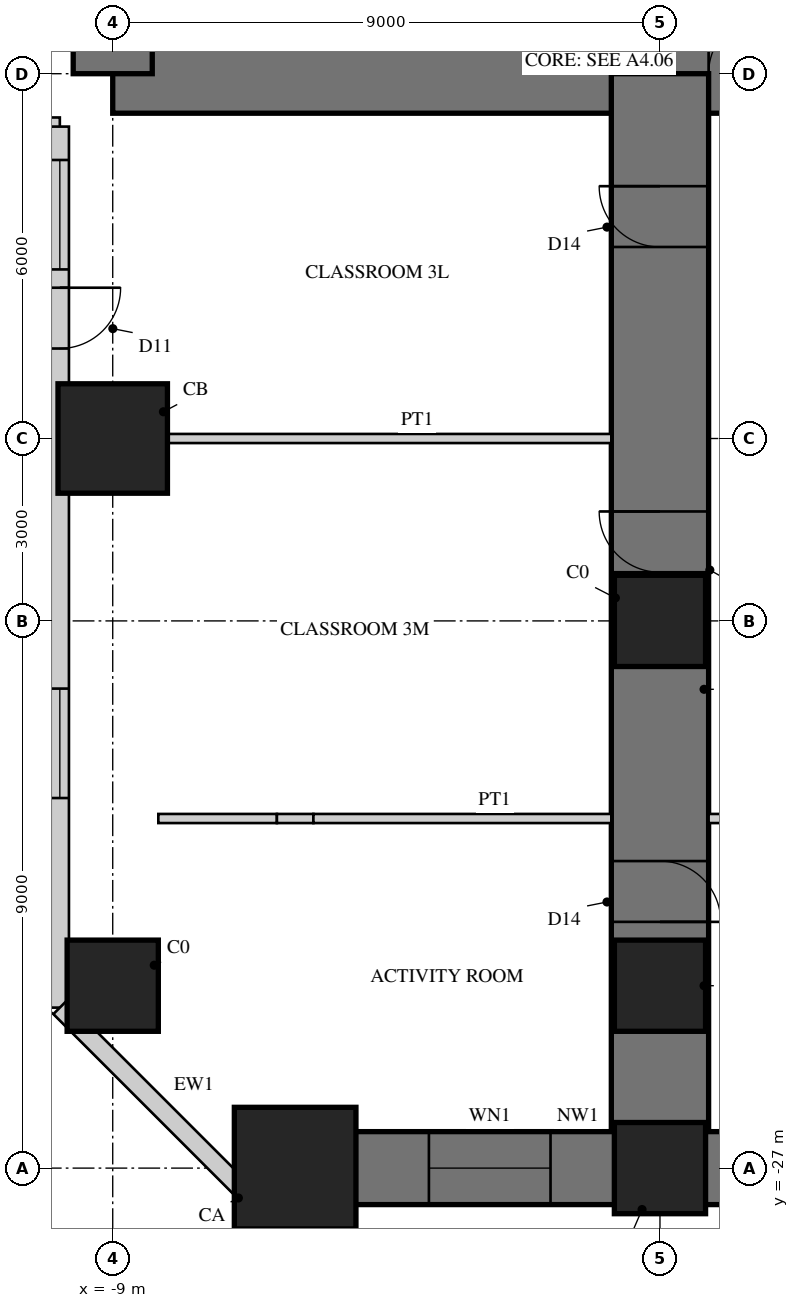
"""IFC4 building model, lengths in metres.
Left out: names, types, materials, properties, quantities, classifications, styles, units other than length and angle.
Written with IfcOpenShell. Run it as: python <this file> out.ifc"""

import sys

from ifc_helpers import new_model, si_unit, direction, frame, frame_2d, origin, origin_2d, place, context, subcontext, project, spatial, rectangle, hollow_rectangle, extrude, element, fill, save


model = new_model("IFC4")
c1 = context("Model", 3, precision=1e-05, world=origin(), true_north=direction((0.0, 1.0)))
c2 = subcontext(c1, "Body", "Model", "MODEL_VIEW")
j1 = project(units=[si_unit("LENGTHUNIT", "METRE"), si_unit("PLANEANGLEUNIT", "RADIAN")], contexts=[c1])
p1 = place(None, origin())
s1 = spatial("IfcSite", under=j1, at=p1, CompositionType="ELEMENT")
p2 = place(p1, origin())
s2 = spatial("IfcBuilding", under=s1, at=p2, CompositionType="ELEMENT")
p3 = place(p2, frame((0.0, 0.0, 14.0)))
s3 = spatial("IfcBuildingStorey", under=s2, at=p3, CompositionType="ELEMENT", Elevation=14.0)
p4 = place(p3, frame((-9.0, -9.0, 0.0), z_axis=(0.0, 0.0, 1.0), x_axis=(1.0, 0.0, 0.0)))
e1 = element("IfcWall", 1, at=p4, inside=s3, PredefinedType="SHEAR", context=c2, shape_type="SweptSolid", body=[
    extrude(rectangle(XDim=18.0, YDim=1.3, at=frame_2d((9.0, 0.0))), origin(), (0.0, 0.0, 1.0), 4.5),
])
p5 = place(p4, frame((9.8, 0.0, 0.0)))
e2 = element("IfcOpeningElement", 2, at=p5, cuts=e1, PredefinedType="OPENING", context=c2, shape_type="SweptSolid", body=[
    extrude(rectangle(XDim=1.0, YDim=2.4, at=frame_2d((0.5, 1.2))), frame((0.0, 0.66, 0.0), z_axis=(0.0, -1.0, 0.0), x_axis=(1.0, 0.0, 0.0)), (0.0, 0.0, 1.0), 1.32),
])
p6 = place(p3, frame((-9.0, 9.0, 0.0), z_axis=(0.0, 0.0, 1.0), x_axis=(0.0, -1.0, 0.0)))
e3 = element("IfcWall", 3, at=p6, inside=s3, PredefinedType="SHEAR", context=c2, shape_type="SweptSolid", body=[
    extrude(rectangle(XDim=18.0, YDim=1.3, at=frame_2d((9.0, 0.0))), origin(), (0.0, 0.0, 1.0), 4.5),
])
p7 = place(p6, frame((9.8, 0.0, 0.0)))
e4 = element("IfcOpeningElement", 4, at=p7, cuts=e3, PredefinedType="OPENING", context=c2, shape_type="SweptSolid", body=[
    extrude(rectangle(XDim=1.0, YDim=2.4, at=frame_2d((0.5, 1.2))), frame((0.0, 0.66, 0.0), z_axis=(0.0, -1.0, 0.0), x_axis=(1.0, 0.0, 0.0)), (0.0, 0.0, 1.0), 1.32),
])
p8 = place(p3, frame((0.0, -9.0, 0.0), z_axis=(0.0, 0.0, 1.0), x_axis=(0.0, -1.0, 0.0)))
e5 = element("IfcWall", 5, at=p8, inside=s3, PredefinedType="SHEAR", context=c2, shape_type="SweptSolid", body=[
    extrude(rectangle(XDim=18.0, YDim=1.6, at=frame_2d((9.0, 0.0))), origin(), (0.0, 0.0, 1.0), 4.5),
])
p9 = place(p8, frame((1.85, 0.0, 0.0)))
e6 = element("IfcOpeningElement", 6, at=p9, cuts=e5, PredefinedType="OPENING", context=c2, shape_type="SweptSolid", body=[
    extrude(rectangle(XDim=1.0, YDim=2.2, at=frame_2d((0.5, 1.1))), frame((0.0, 0.81, 0.0), z_axis=(0.0, -1.0, 0.0), x_axis=(1.0, 0.0, 0.0)), (0.0, 0.0, 1.0), 1.62),
])
p10 = place(p8, frame((7.2, 0.0, 0.0)))
e7 = element("IfcOpeningElement", 7, at=p10, cuts=e5, PredefinedType="OPENING", context=c2, shape_type="SweptSolid", body=[
    extrude(rectangle(XDim=1.0, YDim=2.2, at=frame_2d((0.5, 1.1))), frame((0.0, 0.81, 0.0), z_axis=(0.0, -1.0, 0.0), x_axis=(1.0, 0.0, 0.0)), (0.0, 0.0, 1.0), 1.62),
])
p11 = place(p8, frame((12.95, 0.0, 0.0)))
e8 = element("IfcOpeningElement", 8, at=p11, cuts=e5, PredefinedType="OPENING", context=c2, shape_type="SweptSolid", body=[
    extrude(rectangle(XDim=1.0, YDim=2.2, at=frame_2d((0.5, 1.1))), frame((0.0, 0.81, 0.0), z_axis=(0.0, -1.0, 0.0), x_axis=(1.0, 0.0, 0.0)), (0.0, 0.0, 1.0), 1.62),
])
p12 = place(p3, frame((-6.0, -27.0, 0.0), z_axis=(0.0, 0.0, 1.0), x_axis=(1.0, 0.0, 0.0)))
e9 = element("IfcWall", 9, at=p12, inside=s3, PredefinedType="SHEAR", context=c2, shape_type="SweptSolid", body=[
    extrude(rectangle(XDim=12.0, YDim=1.2, at=frame_2d((6.0, 0.0))), origin(), (0.0, 0.0, 1.0), 4.5),
])
p13 = place(p12, frame((2.2, 0.0, 0.9)))
e10 = element("IfcOpeningElement", 10, at=p13, cuts=e9, PredefinedType="OPENING", context=c2, shape_type="SweptSolid", body=[
    extrude(rectangle(XDim=2.0, YDim=1.8, at=frame_2d((1.0, 0.9))), frame((0.0, 0.61, 0.0), z_axis=(0.0, -1.0, 0.0), x_axis=(1.0, 0.0, 0.0)), (0.0, 0.0, 1.0), 1.22),
])
p14 = place(p12, frame((7.8, 0.0, 0.9)))
e11 = element("IfcOpeningElement", 11, at=p14, cuts=e9, PredefinedType="OPENING", context=c2, shape_type="SweptSolid", body=[
    extrude(rectangle(XDim=2.0, YDim=1.8, at=frame_2d((1.0, 0.9))), frame((0.0, 0.61, 0.0), z_axis=(0.0, -1.0, 0.0), x_axis=(1.0, 0.0, 0.0)), (0.0, 0.0, 1.0), 1.22),
])
p15 = place(p3, frame((-9.0, -15.0, 0.0), z_axis=(0.0, 0.0, 1.0), x_axis=(1.0, 0.0, 0.0)))
e12 = element("IfcColumn", 12, at=p15, inside=s3, PredefinedType="COLUMN", context=c2, shape_type="SweptSolid", body=[
    extrude(rectangle(XDim=1.8, YDim=1.8, at=origin_2d()), origin(), (0.0, 0.0, 1.0), 4.5),
])
p16 = place(p3, frame((-9.0, -24.0, 0.0), z_axis=(0.0, 0.0, 1.0), x_axis=(1.0, 0.0, 0.0)))
e13 = element("IfcColumn", 13, at=p16, inside=s3, PredefinedType="COLUMN", context=c2, shape_type="SweptSolid", body=[
    extrude(rectangle(XDim=1.5, YDim=1.5, at=origin_2d()), origin(), (0.0, 0.0, 1.0), 4.5),
])
p17 = place(p3, frame((-6.0, -27.0, 0.0), z_axis=(0.0, 0.0, 1.0), x_axis=(1.0, 0.0, 0.0)))
e14 = element("IfcColumn", 14, at=p17, inside=s3, PredefinedType="COLUMN", context=c2, shape_type="SweptSolid", body=[
    extrude(rectangle(XDim=2.0, YDim=2.0, at=origin_2d()), origin(), (0.0, 0.0, 1.0), 4.5),
])
for number, where, z_axis, x_axis in (
    (15, (0.0, -27.0, 0.0), (0.0, 0.0, 1.0), (1.0, 0.0, 0.0)),
    (16, (0.0, -18.0, 0.0), (0.0, 0.0, 1.0), (1.0, 0.0, 0.0)),
    (17, (0.0, -24.0, 0.0), (0.0, 0.0, 1.0), (1.0, 0.0, 0.0)),
):
    element("IfcColumn", number, at=place(p3, frame(where, z_axis=z_axis, x_axis=x_axis)), inside=s3, PredefinedType="COLUMN", context=c2, shape_type="SweptSolid", body=[
        extrude(rectangle(XDim=1.5, YDim=1.5, at=origin_2d()), origin(), (0.0, 0.0, 1.0), 4.5),
    ])
p18 = place(p3, frame((-24.36, -9.87, 0.0), z_axis=(0.0, 0.0, 1.0), x_axis=(1.0, 0.0, 0.0)))
e18 = element("IfcWall", 18, at=p18, inside=s3, PredefinedType="SOLIDWALL", context=c2, shape_type="SweptSolid", body=[
    extrude(rectangle(XDim=14.49, YDim=0.3, at=frame_2d((7.245, 0.0))), origin(), (0.0, 0.0, 1.0), 4.25),
])
p19 = place(p18, frame((10.9, 0.0, 0.0)))
e19 = element("IfcOpeningElement", 19, at=p19, cuts=e18, PredefinedType="OPENING", context=c2, shape_type="SweptSolid", body=[
    extrude(rectangle(XDim=1.0, YDim=2.4, at=frame_2d((0.5, 1.2))), frame((0.0, 0.16, 0.0), z_axis=(0.0, -1.0, 0.0), x_axis=(1.0, 0.0, 0.0)), (0.0, 0.0, 1.0), 0.32),
])
p20 = place(p18, frame((3.447, 0.0, 0.6)))
e20 = element("IfcOpeningElement", 20, at=p20, cuts=e18, PredefinedType="OPENING", context=c2, shape_type="SweptSolid", body=[
    extrude(rectangle(XDim=1.8, YDim=2.1, at=frame_2d((0.9, 1.05))), frame((0.0, 0.16, 0.0), z_axis=(0.0, -1.0, 0.0), x_axis=(1.0, 0.0, 0.0)), (0.0, 0.0, 1.0), 0.32),
])
p21 = place(p18, frame((12.141, 0.0, 0.6)))
e21 = element("IfcOpeningElement", 21, at=p21, cuts=e18, PredefinedType="OPENING", context=c2, shape_type="SweptSolid", body=[
    extrude(rectangle(XDim=1.8, YDim=2.1, at=frame_2d((0.9, 1.05))), frame((0.0, 0.16, 0.0), z_axis=(0.0, -1.0, 0.0), x_axis=(1.0, 0.0, 0.0)), (0.0, 0.0, 1.0), 0.32),
])
p22 = place(p3, frame((-9.87, -9.87, 0.0), z_axis=(0.0, 0.0, 1.0), x_axis=(0.0, -1.0, 0.0)))
e22 = element("IfcWall", 22, at=p22, inside=s3, PredefinedType="SOLIDWALL", context=c2, shape_type="SweptSolid", body=[
    extrude(rectangle(XDim=14.49, YDim=0.3, at=frame_2d((7.245, 0.0))), origin(), (0.0, 0.0, 1.0), 4.25),
])
p23 = place(p22, frame((2.65, 0.0, 0.0)))
e23 = element("IfcOpeningElement", 23, at=p23, cuts=e22, PredefinedType="OPENING", context=c2, shape_type="SweptSolid", body=[
    extrude(rectangle(XDim=1.0, YDim=2.4, at=frame_2d((0.5, 1.2))), frame((0.0, 0.16, 0.0), z_axis=(0.0, -1.0, 0.0), x_axis=(1.0, 0.0, 0.0)), (0.0, 0.0, 1.0), 0.32),
])
p24 = place(p22, frame((0.549, 0.0, 0.6)))
e24 = element("IfcOpeningElement", 24, at=p24, cuts=e22, PredefinedType="OPENING", context=c2, shape_type="SweptSolid", body=[
    extrude(rectangle(XDim=1.8, YDim=2.1, at=frame_2d((0.9, 1.05))), frame((0.0, 0.16, 0.0), z_axis=(0.0, -1.0, 0.0), x_axis=(1.0, 0.0, 0.0)), (0.0, 0.0, 1.0), 0.32),
])
p25 = place(p22, frame((9.243, 0.0, 0.6)))
e25 = element("IfcOpeningElement", 25, at=p25, cuts=e22, PredefinedType="OPENING", context=c2, shape_type="SweptSolid", body=[
    extrude(rectangle(XDim=1.8, YDim=2.1, at=frame_2d((0.9, 1.05))), frame((0.0, 0.16, 0.0), z_axis=(0.0, -1.0, 0.0), x_axis=(1.0, 0.0, 0.0)), (0.0, 0.0, 1.0), 0.32),
])
p26 = place(p3, frame((-9.87, -24.36, 0.0), z_axis=(0.0, 0.0, 1.0), x_axis=(0.707106781187, -0.707106781187, 0.0)))
e26 = element("IfcWall", 26, at=p26, inside=s3, PredefinedType="SOLIDWALL", context=c2, shape_type="SweptSolid", body=[
    extrude(rectangle(XDim=4.582, YDim=0.3, at=frame_2d((2.291, 0.0))), origin(), (0.0, 0.0, 1.0), 4.25),
])
p27 = place(p3, frame((-8.25, -15.0, 0.0), z_axis=(0.0, 0.0, 1.0), x_axis=(1.0, 0.0, 0.0)))
e27 = element("IfcWall", 27, at=p27, inside=s3, PredefinedType="PARTITIONING", context=c2, shape_type="SweptSolid", body=[
    extrude(rectangle(XDim=7.45, YDim=0.15, at=frame_2d((3.725, 0.0))), origin(), (0.0, 0.0, 1.0), 3.2),
])
p28 = place(p3, frame((-8.25, -21.25, 0.0), z_axis=(0.0, 0.0, 1.0), x_axis=(1.0, 0.0, 0.0)))
e28 = element("IfcWall", 28, at=p28, inside=s3, PredefinedType="PARTITIONING", context=c2, shape_type="SweptSolid", body=[
    extrude(rectangle(XDim=1.95, YDim=0.15, at=frame_2d((0.975, 0.0))), origin(), (0.0, 0.0, 1.0), 3.3),
])
p29 = place(p3, frame((-6.3, -21.25, 0.0), z_axis=(0.0, 0.0, 1.0), x_axis=(1.0, 0.0, 0.0)))
e29 = element("IfcWall", 29, at=p29, inside=s3, PredefinedType="PARTITIONING", context=c2, shape_type="SweptSolid", body=[
    extrude(rectangle(XDim=0.6, YDim=0.15, at=frame_2d((0.3, 0.0))), origin(), (0.0, 0.0, 1.0), 4.25),
])
p30 = place(p3, frame((-5.7, -21.25, 0.0), z_axis=(0.0, 0.0, 1.0), x_axis=(1.0, 0.0, 0.0)))
e30 = element("IfcWall", 30, at=p30, inside=s3, PredefinedType="PARTITIONING", context=c2, shape_type="SweptSolid", body=[
    extrude(rectangle(XDim=4.9, YDim=0.15, at=frame_2d((2.45, 0.0))), origin(), (0.0, 0.0, 1.0), 3.3),
])
p31 = place(p3, frame((0.8, -21.25, 0.0), z_axis=(0.0, 0.0, 1.0), x_axis=(1.0, 0.0, 0.0)))
e31 = element("IfcWall", 31, at=p31, inside=s3, PredefinedType="PARTITIONING", context=c2, shape_type="SweptSolid", body=[
    extrude(rectangle(XDim=4.9, YDim=0.15, at=frame_2d((2.45, 0.0))), origin(), (0.0, 0.0, 1.0), 3.3),
])
p32 = place(p31, frame((0.35, 0.0, 0.0)))
e32 = element("IfcOpeningElement", 32, at=p32, cuts=e31, PredefinedType="OPENING", context=c2, shape_type="SweptSolid", body=[
    extrude(rectangle(XDim=1.0, YDim=2.2, at=frame_2d((0.5, 1.1))), frame((0.0, 0.085, 0.0), z_axis=(0.0, -1.0, 0.0), x_axis=(1.0, 0.0, 0.0)), (0.0, 0.0, 1.0), 0.17),
])
p33 = place(p23, origin())
e33 = element("IfcDoor", 33, at=p33, inside=s3, OperationType="SINGLE_SWING_LEFT", PredefinedType="DOOR", context=c2, shape_type="SweptSolid", body=[
    extrude(hollow_rectangle(XDim=1.0, YDim=2.4, WallThickness=0.06, at=frame_2d((0.5, 1.2))), frame((0.0, 0.025, 0.0), z_axis=(0.0, -1.0, 0.0), x_axis=(1.0, 0.0, 0.0)), (0.0, 0.0, 1.0), 0.05),
    extrude(rectangle(XDim=0.879, YDim=2.279, at=frame_2d((0.5, 1.2))), frame((0.0, 0.025, 0.0), z_axis=(0.0, -1.0, 0.0), x_axis=(1.0, 0.0, 0.0)), (0.0, 0.0, 1.0), 0.05),
])
fill(e23, e33)
p34 = place(p24, origin())
e34 = element("IfcWindow", 34, at=p34, inside=s3, PartitioningType="SINGLE_PANEL", PredefinedType="WINDOW", context=c2, shape_type="SweptSolid", body=[
    extrude(hollow_rectangle(XDim=1.8, YDim=2.1, WallThickness=0.06, at=frame_2d((0.9, 1.05))), frame((0.0, 0.03, 0.0), z_axis=(0.0, -1.0, 0.0), x_axis=(1.0, 0.0, 0.0)), (0.0, 0.0, 1.0), 0.06),
    extrude(rectangle(XDim=1.679, YDim=1.979, at=frame_2d((0.9, 1.05))), frame((0.0, 0.03, 0.0), z_axis=(0.0, -1.0, 0.0), x_axis=(1.0, 0.0, 0.0)), (0.0, 0.0, 1.0), 0.06),
])
fill(e24, e34)
p35 = place(p25, origin())
e35 = element("IfcWindow", 35, at=p35, inside=s3, PartitioningType="SINGLE_PANEL", PredefinedType="WINDOW", context=c2, shape_type="SweptSolid", body=[
    extrude(hollow_rectangle(XDim=1.8, YDim=2.1, WallThickness=0.06, at=frame_2d((0.9, 1.05))), frame((0.0, 0.03, 0.0), z_axis=(0.0, -1.0, 0.0), x_axis=(1.0, 0.0, 0.0)), (0.0, 0.0, 1.0), 0.06),
    extrude(rectangle(XDim=1.679, YDim=1.979, at=frame_2d((0.9, 1.05))), frame((0.0, 0.03, 0.0), z_axis=(0.0, -1.0, 0.0), x_axis=(1.0, 0.0, 0.0)), (0.0, 0.0, 1.0), 0.06),
])
fill(e25, e35)
p36 = place(p13, origin())
e36 = element("IfcWindow", 36, at=p36, inside=s3, PartitioningType="SINGLE_PANEL", PredefinedType="WINDOW", context=c2, shape_type="SweptSolid", body=[
    extrude(hollow_rectangle(XDim=2.0, YDim=1.8, WallThickness=0.06, at=frame_2d((1.0, 0.9))), frame((0.0, 0.03, 0.0), z_axis=(0.0, -1.0, 0.0), x_axis=(1.0, 0.0, 0.0)), (0.0, 0.0, 1.0), 0.06),
    extrude(rectangle(XDim=1.879, YDim=1.679, at=frame_2d((1.0, 0.9))), frame((0.0, 0.03, 0.0), z_axis=(0.0, -1.0, 0.0), x_axis=(1.0, 0.0, 0.0)), (0.0, 0.0, 1.0), 0.06),
])
fill(e10, e36)
p37 = place(p9, frame((1.0, 0.0, 0.0), z_axis=(0.0, 0.0, 1.0), x_axis=(-1.0, 0.0, 0.0)))
e37 = element("IfcDoor", 37, at=p37, inside=s3, OperationType="SINGLE_SWING_RIGHT", PredefinedType="DOOR", context=c2, shape_type="SweptSolid", body=[
    extrude(rectangle(XDim=1.0, YDim=2.2, at=frame_2d((0.5, 1.1))), frame((0.0, 0.025, 0.0), z_axis=(0.0, -1.0, 0.0), x_axis=(1.0, 0.0, 0.0)), (0.0, 0.0, 1.0), 0.05),
])
fill(e6, e37)
p38 = place(p10, frame((1.0, 0.0, 0.0), z_axis=(0.0, 0.0, 1.0), x_axis=(-1.0, 0.0, 0.0)))
e38 = element("IfcDoor", 38, at=p38, inside=s3, OperationType="SINGLE_SWING_RIGHT", PredefinedType="DOOR", context=c2, shape_type="SweptSolid", body=[
    extrude(rectangle(XDim=1.0, YDim=2.2, at=frame_2d((0.5, 1.1))), frame((0.0, 0.025, 0.0), z_axis=(0.0, -1.0, 0.0), x_axis=(1.0, 0.0, 0.0)), (0.0, 0.0, 1.0), 0.05),
])
fill(e7, e38)
p39 = place(p11, origin())
e39 = element("IfcDoor", 39, at=p39, inside=s3, OperationType="SINGLE_SWING_RIGHT", PredefinedType="DOOR", context=c2, shape_type="SweptSolid", body=[
    extrude(rectangle(XDim=1.0, YDim=2.2, at=frame_2d((0.5, 1.1))), frame((0.0, 0.025, 0.0), z_axis=(0.0, -1.0, 0.0), x_axis=(1.0, 0.0, 0.0)), (0.0, 0.0, 1.0), 0.05),
])
fill(e8, e39)
p40 = place(p5, origin())
e40 = element("IfcDoor", 40, at=p40, inside=s3, OperationType="SINGLE_SWING_RIGHT", PredefinedType="DOOR", context=c2, shape_type="SweptSolid", body=[
    extrude(rectangle(XDim=1.0, YDim=2.4, at=frame_2d((0.5, 1.2))), frame((0.0, 0.055, 0.0), z_axis=(0.0, -1.0, 0.0), x_axis=(1.0, 0.0, 0.0)), (0.0, 0.0, 1.0), 0.05),
])
fill(e2, e40)
save(model, sys.argv[1])
